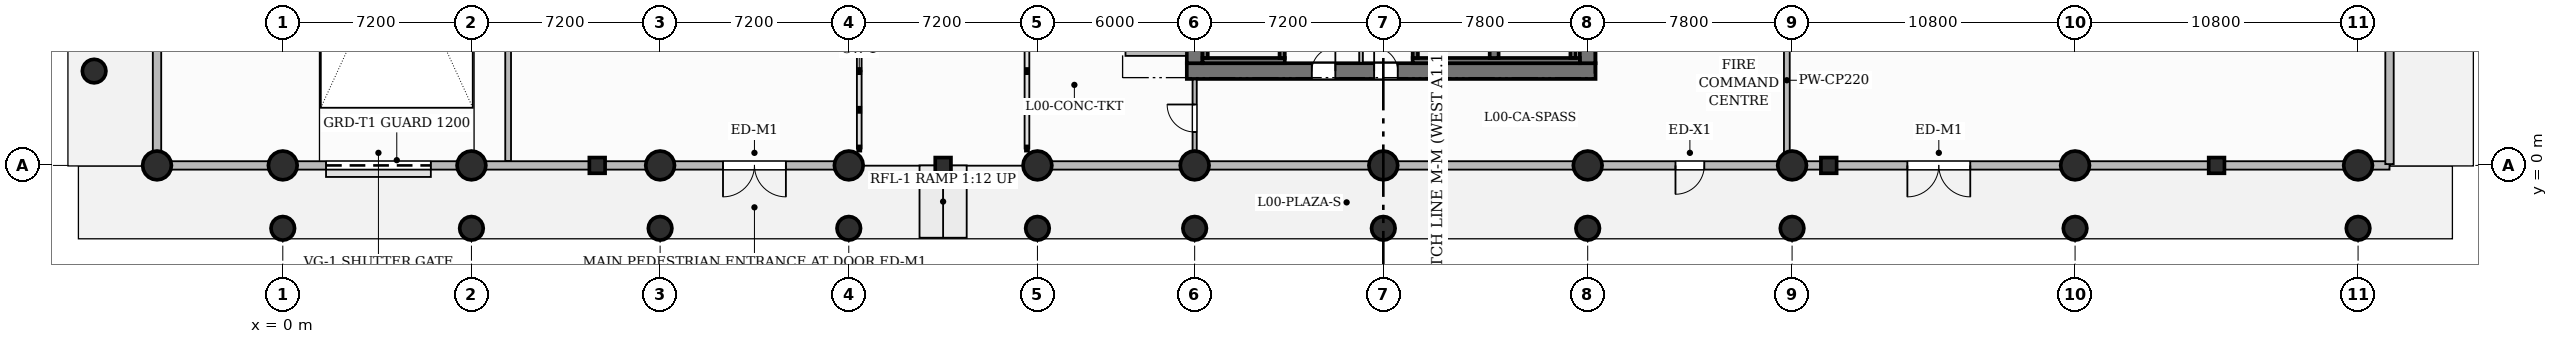
"""IFC4 building model, lengths in metres.
Left out: names, types, materials, properties, quantities, classifications, styles, units other than length and angle.
Written with IfcOpenShell. Run it as: python <this file> out.ifc"""

import sys

from ifc_helpers import new_model, si_unit, direction, frame, frame_2d, origin, origin_2d, place, context, subcontext, project, spatial, rectangle, circle, extrude, source, transform, mapped, element, fill, save


model = new_model("IFC4")
c1 = context("Model", 3, precision=1e-05, world=origin(), true_north=direction((0.0, 1.0)))
c2 = subcontext(c1, "Body", "Model", "MODEL_VIEW")
j1 = project(units=[si_unit("LENGTHUNIT", "METRE"), si_unit("PLANEANGLEUNIT", "RADIAN")], contexts=[c1])
p1 = place(None, origin())
s1 = spatial("IfcSite", under=j1, at=p1, CompositionType="ELEMENT")
p2 = place(p1, origin())
s2 = spatial("IfcBuilding", under=s1, at=p2, CompositionType="ELEMENT")
p3 = place(p2, origin())
s3 = spatial("IfcBuildingStorey", under=s2, at=p3, CompositionType="ELEMENT", Elevation=0.0)
p4 = place(p3, frame((34.5, 3.6, 0.0), z_axis=(0.0, 0.0, 1.0), x_axis=(1.0, 0.0, 0.0)))
e1 = element("IfcWall", 1, at=p4, inside=s3, PredefinedType="SHEAR", context=c2, shape_type="SweptSolid", body=[
    extrude(rectangle(XDim=15.6, YDim=0.6, at=frame_2d((7.8, 0.0))), origin(), (0.0, 0.0, 1.0), 5.4),
])
p5 = place(p4, frame((4.77, 0.0, 0.0)))
e2 = element("IfcOpeningElement", 2, at=p5, cuts=e1, PredefinedType="OPENING", context=c2, shape_type="SweptSolid", body=[
    extrude(rectangle(XDim=0.9, YDim=2.1, at=frame_2d((0.45, 1.05))), frame((0.0, 0.31, 0.0), z_axis=(0.0, -1.0, 0.0), x_axis=(1.0, 0.0, 0.0)), (0.0, 0.0, 1.0), 0.62),
])
p6 = place(p4, frame((7.15, 0.0, 0.0)))
e3 = element("IfcOpeningElement", 3, at=p6, cuts=e1, PredefinedType="OPENING", context=c2, shape_type="SweptSolid", body=[
    extrude(rectangle(XDim=0.9, YDim=2.1, at=frame_2d((0.45, 1.05))), frame((0.0, 0.31, 0.0), z_axis=(0.0, -1.0, 0.0), x_axis=(1.0, 0.0, 0.0)), (0.0, 0.0, 1.0), 0.62),
])
p7 = place(p3, frame((34.8, 3.9, 0.0), z_axis=(0.0, 0.0, 1.0), x_axis=(0.0, 1.0, 0.0)))
e4 = element("IfcWall", 4, at=p7, inside=s3, PredefinedType="SHEAR", context=c2, shape_type="SweptSolid", body=[
    extrude(rectangle(XDim=10.2, YDim=0.6, at=frame_2d((5.1, 0.0))), origin(), (0.0, 0.0, 1.0), 5.4),
])
p8 = place(p3, frame((49.8, 3.9, 0.0), z_axis=(0.0, 0.0, 1.0), x_axis=(0.0, 1.0, 0.0)))
e5 = element("IfcWall", 5, at=p8, inside=s3, PredefinedType="SHEAR", context=c2, shape_type="SweptSolid", body=[
    extrude(rectangle(XDim=10.2, YDim=0.6, at=frame_2d((5.1, 0.0))), origin(), (0.0, 0.0, 1.0), 5.4),
])
p9 = place(p8, frame((8.225, 0.0, 0.0)))
e6 = element("IfcOpeningElement", 6, at=p9, cuts=e5, PredefinedType="OPENING", context=c2, shape_type="SweptSolid", body=[
    extrude(rectangle(XDim=1.05, YDim=2.2, at=frame_2d((0.525, 1.1))), frame((0.0, 0.31, 0.0), z_axis=(0.0, -1.0, 0.0), x_axis=(1.0, 0.0, 0.0)), (0.0, 0.0, 1.0), 0.62),
])
m1 = source(origin(), c2, "Body", "SweptSolid", [
    extrude(circle(Radius=0.55, at=origin_2d()), origin(), (0.0, 0.0, 1.0), 5.4),
])
for number, where, z_axis, x_axis in (
    (7, (-4.8, 0.0, 0.0), (0.0, 0.0, 1.0), (1.0, 0.0, 0.0)),
    (8, (0.0, 0.0, 0.0), (0.0, 0.0, 1.0), (1.0, 0.0, 0.0)),
    (9, (7.2, 0.0, 0.0), (0.0, 0.0, 1.0), (1.0, 0.0, 0.0)),
    (10, (14.4, 0.0, 0.0), (0.0, 0.0, 1.0), (1.0, 0.0, 0.0)),
    (11, (21.6, 0.0, 0.0), (0.0, 0.0, 1.0), (1.0, 0.0, 0.0)),
    (12, (28.8, 0.0, 0.0), (0.0, 0.0, 1.0), (1.0, 0.0, 0.0)),
    (13, (34.8, 0.0, 0.0), (0.0, 0.0, 1.0), (1.0, 0.0, 0.0)),
    (14, (42.0, 0.0, 0.0), (0.0, 0.0, 1.0), (1.0, 0.0, 0.0)),
    (15, (49.8, 0.0, 0.0), (0.0, 0.0, 1.0), (1.0, 0.0, 0.0)),
    (16, (57.6, 0.0, 0.0), (0.0, 0.0, 1.0), (1.0, 0.0, 0.0)),
    (17, (68.4, 0.0, 0.0), (0.0, 0.0, 1.0), (1.0, 0.0, 0.0)),
    (18, (79.2, 0.0, 0.0), (0.0, 0.0, 1.0), (1.0, 0.0, 0.0)),
):
    element("IfcColumn", number, at=place(p3, frame(where, z_axis=z_axis, x_axis=x_axis)), inside=s3, PredefinedType="COLUMN", context=c2, shape_type="MappedRepresentation", body=[
        mapped(m1, transform((0.0, 0.0, 0.0), scale=1.0)),
    ])
m2 = source(origin(), c2, "Body", "SweptSolid", [
    extrude(circle(Radius=0.45, at=origin_2d()), origin(), (0.0, 0.0, 1.0), 5.4),
])
for number, where, z_axis, x_axis in (
    (19, (-7.2, 3.6, 0.0), (0.0, 0.0, 1.0), (1.0, 0.0, 0.0)),
    (20, (0.0, -2.4, 0.0), (0.0, 0.0, 1.0), (1.0, 0.0, 0.0)),
    (21, (7.2, -2.4, 0.0), (0.0, 0.0, 1.0), (1.0, 0.0, 0.0)),
    (22, (14.4, -2.4, 0.0), (0.0, 0.0, 1.0), (1.0, 0.0, 0.0)),
    (23, (21.6, -2.4, 0.0), (0.0, 0.0, 1.0), (1.0, 0.0, 0.0)),
    (24, (28.8, -2.4, 0.0), (0.0, 0.0, 1.0), (1.0, 0.0, 0.0)),
    (25, (34.8, -2.4, 0.0), (0.0, 0.0, 1.0), (1.0, 0.0, 0.0)),
    (26, (42.0, -2.4, 0.0), (0.0, 0.0, 1.0), (1.0, 0.0, 0.0)),
    (27, (49.8, -2.4, 0.0), (0.0, 0.0, 1.0), (1.0, 0.0, 0.0)),
    (28, (57.6, -2.4, 0.0), (0.0, 0.0, 1.0), (1.0, 0.0, 0.0)),
    (29, (68.4, -2.4, 0.0), (0.0, 0.0, 1.0), (1.0, 0.0, 0.0)),
    (30, (79.2, -2.4, 0.0), (0.0, 0.0, 1.0), (1.0, 0.0, 0.0)),
):
    element("IfcColumn", number, at=place(p3, frame(where, z_axis=z_axis, x_axis=x_axis)), inside=s3, PredefinedType="COLUMN", context=c2, shape_type="MappedRepresentation", body=[
        mapped(m2, transform((0.0, 0.0, 0.0), scale=1.0)),
    ])
m3 = source(origin(), c2, "Body", "SweptSolid", [
    extrude(rectangle(XDim=0.6, YDim=0.6, at=origin_2d()), origin(), (0.0, 0.0, 1.0), 5.4),
])
for number, where, z_axis, x_axis in (
    (31, (12.0, 0.0, 0.0), (0.0, 0.0, 1.0), (1.0, 0.0, 0.0)),
    (32, (25.2, 0.0, 0.0), (0.0, 0.0, 1.0), (1.0, 0.0, 0.0)),
    (33, (59.0, 0.0, 0.0), (0.0, 0.0, 1.0), (1.0, 0.0, 0.0)),
    (34, (73.8, 0.0, 0.0), (0.0, 0.0, 1.0), (1.0, 0.0, 0.0)),
):
    element("IfcColumn", number, at=place(p3, frame(where, z_axis=z_axis, x_axis=x_axis)), inside=s3, PredefinedType="PILASTER", context=c2, shape_type="MappedRepresentation", body=[
        mapped(m3, transform((0.0, 0.0, 0.0), scale=1.0)),
    ])
p10 = place(p3, frame((35.1, 4.0, 0.0), z_axis=(0.0, 0.0, 1.0), x_axis=(1.0, 0.0, 0.0)))
e35 = element("IfcWall", 35, at=p10, inside=s3, PredefinedType="SHEAR", context=c2, shape_type="SweptSolid", body=[
    extrude(rectangle(XDim=3.14, YDim=0.2, at=frame_2d((1.57, 0.0))), origin(), (0.0, 0.0, 1.0), 5.4),
])
for number, where, z_axis, x_axis in (
    (36, (35.2, 4.1, 0.0), (0.0, 0.0, 1.0), (0.0, 1.0, 0.0)),
    (37, (38.14, 4.1, 0.0), (0.0, 0.0, 1.0), (0.0, 1.0, 0.0)),
):
    element("IfcWall", number, at=place(p3, frame(where, z_axis=z_axis, x_axis=x_axis)), inside=s3, PredefinedType="SHEAR", context=c2, shape_type="SweptSolid", body=[
        extrude(rectangle(XDim=6.95, YDim=0.2, at=frame_2d((3.475, 0.0))), origin(), (0.0, 0.0, 1.0), 5.4),
    ])
p11 = place(p3, frame((43.12, 4.0, 0.0), z_axis=(0.0, 0.0, 1.0), x_axis=(1.0, 0.0, 0.0)))
e38 = element("IfcWall", 38, at=p11, inside=s3, PredefinedType="SHEAR", context=c2, shape_type="SweptSolid", body=[
    extrude(rectangle(XDim=6.38, YDim=0.2, at=frame_2d((3.19, 0.0))), origin(), (0.0, 0.0, 1.0), 5.4),
])
p12 = place(p3, frame((43.22, 4.1, 0.0), z_axis=(0.0, 0.0, 1.0), x_axis=(0.0, 1.0, 0.0)))
e39 = element("IfcWall", 39, at=p12, inside=s3, PredefinedType="SHEAR", context=c2, shape_type="SweptSolid", body=[
    extrude(rectangle(XDim=6.95, YDim=0.2, at=frame_2d((3.475, 0.0))), origin(), (0.0, 0.0, 1.0), 5.4),
])
p13 = place(p3, frame((46.23, 4.1, 0.0), z_axis=(0.0, 0.0, 1.0), x_axis=(0.0, 1.0, 0.0)))
e40 = element("IfcWall", 40, at=p13, inside=s3, PredefinedType="SHEAR", context=c2, shape_type="SweptSolid", body=[
    extrude(rectangle(XDim=6.95, YDim=0.34, at=frame_2d((3.475, 0.0))), origin(), (0.0, 0.0, 1.0), 5.4),
])
p14 = place(p3, frame((49.24, 4.1, 0.0), z_axis=(0.0, 0.0, 1.0), x_axis=(0.0, 1.0, 0.0)))
e41 = element("IfcWall", 41, at=p14, inside=s3, PredefinedType="SHEAR", context=c2, shape_type="SweptSolid", body=[
    extrude(rectangle(XDim=6.95, YDim=0.2, at=frame_2d((3.475, 0.0))), origin(), (0.0, 0.0, 1.0), 5.4),
])
p15 = place(p3, frame((41.15, 3.92, 0.0), z_axis=(0.0, 0.0, 1.0), x_axis=(0.0, 1.0, 0.0)))
e42 = element("IfcWall", 42, at=p15, inside=s3, PredefinedType="PARTITIONING", context=c2, shape_type="SweptSolid", body=[
    extrude(rectangle(XDim=3.99, YDim=0.14, at=frame_2d((1.995, 0.0))), origin(), (0.0, 0.0, 1.0), 5.1),
])
p16 = place(p3, frame((32.16, 4.28, 0.0), z_axis=(0.0, 0.0, 1.0), x_axis=(1.0, 0.0, 0.0)))
e43 = element("IfcWall", 43, at=p16, inside=s3, PredefinedType="PARTITIONING", context=c2, shape_type="SweptSolid", body=[
    extrude(rectangle(XDim=2.31, YDim=0.2, at=frame_2d((1.155, 0.0))), origin(), (0.0, 0.0, 1.0), 5.1),
])
p17 = place(p3, frame((57.4, 0.39, 0.0), z_axis=(0.0, 0.0, 1.0), x_axis=(0.0, 1.0, 0.0)))
e44 = element("IfcWall", 44, at=p17, inside=s3, PredefinedType="PARTITIONING", context=c2, shape_type="SweptSolid", body=[
    extrude(rectangle(XDim=5.72, YDim=0.22, at=frame_2d((2.86, 0.0))), origin(), (0.0, 0.0, 1.0), 4.085),
])
p18 = place(p3, frame((34.8, 0.32, 0.0), z_axis=(0.0, 0.0, 1.0), x_axis=(0.0, 1.0, 0.0)))
e45 = element("IfcWall", 45, at=p18, inside=s3, PredefinedType="PARTITIONING", context=c2, shape_type="SweptSolid", body=[
    extrude(rectangle(XDim=2.96, YDim=0.16, at=frame_2d((1.48, 0.0))), origin(), (0.0, 0.0, 1.0), 5.1),
])
p19 = place(p18, frame((0.955, 0.0, 0.0)))
e46 = element("IfcOpeningElement", 46, at=p19, cuts=e45, PredefinedType="OPENING", context=c2, shape_type="SweptSolid", body=[
    extrude(rectangle(XDim=1.05, YDim=2.15, at=frame_2d((0.525, 1.075))), frame((0.0, 0.09, 0.0), z_axis=(0.0, -1.0, 0.0), x_axis=(1.0, 0.0, 0.0)), (0.0, 0.0, 1.0), 0.18),
])
p20 = place(p3, frame((8.6, 0.168, 0.0), z_axis=(0.0, 0.0, 1.0), x_axis=(0.0, 1.0, 0.0)))
e47 = element("IfcWall", 47, at=p20, inside=s3, PredefinedType="PARTITIONING", context=c2, shape_type="SweptSolid", body=[
    extrude(rectangle(XDim=14.942, YDim=0.22, at=frame_2d((7.471, 0.0))), origin(), (0.0, 0.0, 1.0), 5.1),
])
p21 = place(p20, frame((10.107, 0.0, 0.0)))
e48 = element("IfcOpeningElement", 48, at=p21, cuts=e47, PredefinedType="OPENING", context=c2, shape_type="SweptSolid", body=[
    extrude(rectangle(XDim=1.05, YDim=2.15, at=frame_2d((0.525, 1.075))), frame((0.0, 0.12, 0.0), z_axis=(0.0, -1.0, 0.0), x_axis=(1.0, 0.0, 0.0)), (0.0, 0.0, 1.0), 0.24),
])
p22 = place(p3, frame((-4.8, 0.0, 0.0), z_axis=(0.0, 0.0, 1.0), x_axis=(1.0, 0.0, 0.0)))
e49 = element("IfcWall", 49, at=p22, inside=s3, PredefinedType="SOLIDWALL", context=c2, shape_type="SweptSolid", body=[
    extrude(rectangle(XDim=26.85, YDim=0.32, at=frame_2d((13.425, 0.0))), origin(), (0.0, 0.0, 1.0), 4.085),
])
p23 = place(p22, frame((6.45, 0.0, 0.0)))
e50 = element("IfcOpeningElement", 50, at=p23, cuts=e49, PredefinedType="OPENING", context=c2, shape_type="SweptSolid", body=[
    extrude(rectangle(XDim=4.0, YDim=3.2, at=frame_2d((2.0, 1.6))), frame((0.0, 0.17, 0.0), z_axis=(0.0, -1.0, 0.0), x_axis=(1.0, 0.0, 0.0)), (0.0, 0.0, 1.0), 0.34),
])
p24 = place(p22, frame((21.6, 0.0, 0.0)))
e51 = element("IfcOpeningElement", 51, at=p24, cuts=e49, PredefinedType="OPENING", context=c2, shape_type="SweptSolid", body=[
    extrude(rectangle(XDim=2.4, YDim=2.8, at=frame_2d((1.2, 1.4))), frame((0.0, 0.17, 0.0), z_axis=(0.0, -1.0, 0.0), x_axis=(1.0, 0.0, 0.0)), (0.0, 0.0, 1.0), 0.34),
])
p25 = place(p3, frame((28.35, 0.0, 0.0), z_axis=(0.0, 0.0, 1.0), x_axis=(1.0, 0.0, 0.0)))
e52 = element("IfcWall", 52, at=p25, inside=s3, PredefinedType="SOLIDWALL", context=c2, shape_type="SweptSolid", body=[
    extrude(rectangle(XDim=52.05, YDim=0.32, at=frame_2d((26.025, 0.0))), origin(), (0.0, 0.0, 1.0), 4.085),
])
p26 = place(p25, frame((24.8, 0.0, 0.0)))
e53 = element("IfcOpeningElement", 53, at=p26, cuts=e52, PredefinedType="OPENING", context=c2, shape_type="SweptSolid", body=[
    extrude(rectangle(XDim=1.1, YDim=2.2, at=frame_2d((0.55, 1.1))), frame((0.0, 0.17, 0.0), z_axis=(0.0, -1.0, 0.0), x_axis=(1.0, 0.0, 0.0)), (0.0, 0.0, 1.0), 0.34),
])
p27 = place(p25, frame((33.65, 0.0, 0.0)))
e54 = element("IfcOpeningElement", 54, at=p27, cuts=e52, PredefinedType="OPENING", context=c2, shape_type="SweptSolid", body=[
    extrude(rectangle(XDim=2.4, YDim=2.8, at=frame_2d((1.2, 1.4))), frame((0.0, 0.17, 0.0), z_axis=(0.0, -1.0, 0.0), x_axis=(1.0, 0.0, 0.0)), (0.0, 0.0, 1.0), 0.34),
])
p28 = place(p3, frame((80.4, 0.05, 0.0), z_axis=(0.0, 0.0, 1.0), x_axis=(0.0, 1.0, 0.0)))
e55 = element("IfcWall", 55, at=p28, inside=s3, PredefinedType="SOLIDWALL", context=c2, shape_type="SweptSolid", body=[
    extrude(rectangle(XDim=46.7, YDim=0.32, at=frame_2d((23.35, 0.0))), origin(), (0.0, 0.0, 1.0), 5.1),
])
p29 = place(p28, frame((11.5, 0.0, 0.0)))
e56 = element("IfcOpeningElement", 56, at=p29, cuts=e55, PredefinedType="OPENING", context=c2, shape_type="SweptSolid", body=[
    extrude(rectangle(XDim=1.8, YDim=2.4, at=frame_2d((0.9, 1.2))), frame((0.0, 0.17, 0.0), z_axis=(0.0, -1.0, 0.0), x_axis=(1.0, 0.0, 0.0)), (0.0, 0.0, 1.0), 0.34),
])
p30 = place(p28, frame((16.75, 0.0, 0.0)))
e57 = element("IfcOpeningElement", 57, at=p30, cuts=e55, PredefinedType="OPENING", context=c2, shape_type="SweptSolid", body=[
    extrude(rectangle(XDim=2.4, YDim=2.8, at=frame_2d((1.2, 1.4))), frame((0.0, 0.17, 0.0), z_axis=(0.0, -1.0, 0.0), x_axis=(1.0, 0.0, 0.0)), (0.0, 0.0, 1.0), 0.34),
])
p31 = place(p28, frame((42.25, 0.0, 0.0)))
e58 = element("IfcOpeningElement", 58, at=p31, cuts=e55, PredefinedType="OPENING", context=c2, shape_type="SweptSolid", body=[
    extrude(rectangle(XDim=1.8, YDim=2.4, at=frame_2d((0.9, 1.2))), frame((0.0, 0.17, 0.0), z_axis=(0.0, -1.0, 0.0), x_axis=(1.0, 0.0, 0.0)), (0.0, 0.0, 1.0), 0.34),
])
p32 = place(p3, frame((-4.8, 0.05, 0.0), z_axis=(0.0, 0.0, 1.0), x_axis=(0.0, 1.0, 0.0)))
e59 = element("IfcWall", 59, at=p32, inside=s3, PredefinedType="SOLIDWALL", context=c2, shape_type="SweptSolid", body=[
    extrude(rectangle(XDim=46.7, YDim=0.32, at=frame_2d((23.35, 0.0))), origin(), (0.0, 0.0, 1.0), 4.085),
])
p33 = place(p32, frame((16.75, 0.0, 0.0)))
e60 = element("IfcOpeningElement", 60, at=p33, cuts=e59, PredefinedType="OPENING", context=c2, shape_type="SweptSolid", body=[
    extrude(rectangle(XDim=2.4, YDim=2.8, at=frame_2d((1.2, 1.4))), frame((0.0, 0.17, 0.0), z_axis=(0.0, -1.0, 0.0), x_axis=(1.0, 0.0, 0.0)), (0.0, 0.0, 1.0), 0.34),
])
p34 = place(p32, frame((27.85, 0.0, 0.0)))
e61 = element("IfcOpeningElement", 61, at=p34, cuts=e59, PredefinedType="OPENING", context=c2, shape_type="SweptSolid", body=[
    extrude(rectangle(XDim=1.8, YDim=2.4, at=frame_2d((0.9, 1.2))), frame((0.0, 0.17, 0.0), z_axis=(0.0, -1.0, 0.0), x_axis=(1.0, 0.0, 0.0)), (0.0, 0.0, 1.0), 0.34),
])
p35 = place(p32, frame((35.05, 0.0, 0.0)))
e62 = element("IfcOpeningElement", 62, at=p35, cuts=e59, PredefinedType="OPENING", context=c2, shape_type="SweptSolid", body=[
    extrude(rectangle(XDim=1.8, YDim=2.4, at=frame_2d((0.9, 1.2))), frame((0.0, 0.17, 0.0), z_axis=(0.0, -1.0, 0.0), x_axis=(1.0, 0.0, 0.0)), (0.0, 0.0, 1.0), 0.34),
])
m4 = source(origin(), c2, "Body", "SweptSolid", [
    extrude(rectangle(XDim=0.9, YDim=2.1, at=frame_2d((0.45, 1.05))), frame((0.0, 0.025, 0.0), z_axis=(0.0, -1.0, 0.0), x_axis=(1.0, 0.0, 0.0)), (0.0, 0.0, 1.0), 0.05),
])
p36 = place(p5, origin())
e63 = element("IfcDoor", 63, at=p36, inside=s3, OperationType="SINGLE_SWING_RIGHT", PredefinedType="DOOR", context=c2, shape_type="MappedRepresentation", body=[
    mapped(m4, transform((0.0, 0.0, 0.0), scale=1.0)),
])
fill(e2, e63)
p37 = place(p6, origin())
e64 = element("IfcDoor", 64, at=p37, inside=s3, OperationType="SINGLE_SWING_LEFT", PredefinedType="DOOR", context=c2, shape_type="MappedRepresentation", body=[
    mapped(m4, transform((0.0, 0.0, 0.0), scale=1.0)),
])
fill(e3, e64)
m5 = source(origin(), c2, "Body", "SweptSolid", [
    extrude(rectangle(XDim=1.05, YDim=2.15, at=frame_2d((0.525, 1.075))), frame((0.0, 0.025, 0.0), z_axis=(0.0, -1.0, 0.0), x_axis=(1.0, 0.0, 0.0)), (0.0, 0.0, 1.0), 0.05),
])
p38 = place(p19, origin())
e65 = element("IfcDoor", 65, at=p38, inside=s3, OperationType="SINGLE_SWING_RIGHT", PredefinedType="DOOR", context=c2, shape_type="MappedRepresentation", body=[
    mapped(m5, transform((0.0, 0.0, 0.0), scale=1.0)),
])
fill(e46, e65)
m6 = source(origin(), c2, "Body", "SweptSolid", [
    extrude(rectangle(XDim=4.0, YDim=3.2, at=frame_2d((2.0, 1.6))), frame((0.0, 0.025, 0.0), z_axis=(0.0, -1.0, 0.0), x_axis=(1.0, 0.0, 0.0)), (0.0, 0.0, 1.0), 0.05),
])
p39 = place(p23, frame((4.0, 0.0, 0.0), z_axis=(0.0, 0.0, 1.0), x_axis=(-1.0, 0.0, 0.0)))
e66 = element("IfcDoor", 66, at=p39, inside=s3, OperationType="ROLLINGUP", PredefinedType="GATE", context=c2, shape_type="MappedRepresentation", body=[
    mapped(m6, transform((0.0, 0.0, 0.0), scale=1.0)),
])
fill(e50, e66)
m7 = source(origin(), c2, "Body", "SweptSolid", [
    extrude(rectangle(XDim=2.4, YDim=2.8, at=frame_2d((1.2, 1.4))), frame((0.0, 0.025, 0.0), z_axis=(0.0, -1.0, 0.0), x_axis=(1.0, 0.0, 0.0)), (0.0, 0.0, 1.0), 0.05),
])
p40 = place(p24, frame((2.4, 0.0, 0.0), z_axis=(0.0, 0.0, 1.0), x_axis=(-1.0, 0.0, 0.0)))
e67 = element("IfcDoor", 67, at=p40, inside=s3, OperationType="DOUBLE_DOOR_SINGLE_SWING", PredefinedType="DOOR", context=c2, shape_type="MappedRepresentation", body=[
    mapped(m7, transform((0.0, 0.0, 0.0), scale=1.0)),
])
fill(e51, e67)
m8 = source(origin(), c2, "Body", "SweptSolid", [
    extrude(rectangle(XDim=1.1, YDim=2.2, at=frame_2d((0.55, 1.1))), frame((0.0, 0.025, 0.0), z_axis=(0.0, -1.0, 0.0), x_axis=(1.0, 0.0, 0.0)), (0.0, 0.0, 1.0), 0.05),
])
p41 = place(p26, frame((1.1, 0.0, 0.0), z_axis=(0.0, 0.0, 1.0), x_axis=(-1.0, 0.0, 0.0)))
e68 = element("IfcDoor", 68, at=p41, inside=s3, OperationType="SINGLE_SWING_LEFT", PredefinedType="DOOR", context=c2, shape_type="MappedRepresentation", body=[
    mapped(m8, transform((0.0, 0.0, 0.0), scale=1.0)),
])
fill(e53, e68)
p42 = place(p27, frame((2.4, 0.0, 0.0), z_axis=(0.0, 0.0, 1.0), x_axis=(-1.0, 0.0, 0.0)))
e69 = element("IfcDoor", 69, at=p42, inside=s3, OperationType="DOUBLE_DOOR_SINGLE_SWING", PredefinedType="DOOR", context=c2, shape_type="MappedRepresentation", body=[
    mapped(m7, transform((0.0, 0.0, 0.0), scale=1.0)),
])
fill(e54, e69)
save(model, sys.argv[1])
